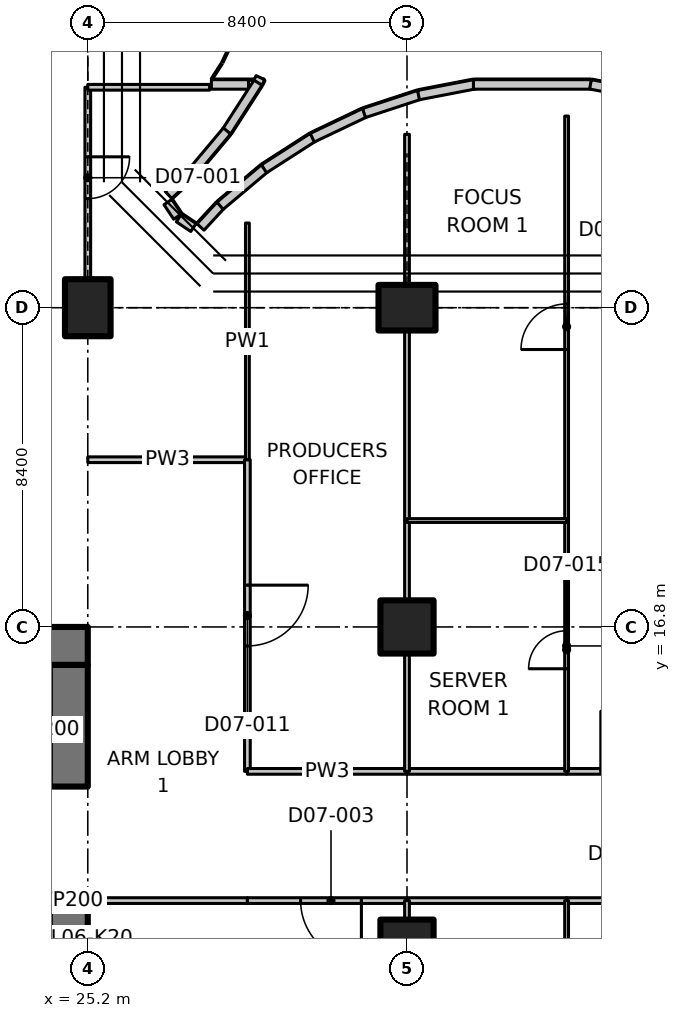
"""IFC4 building model, lengths in metres.
Left out: names, types, materials, properties, quantities, classifications, styles, units other than length and angle.
Written with IfcOpenShell. Run it as: python <this file> out.ifc"""

import sys

from ifc_helpers import new_model, si_unit, direction, frame, frame_2d, origin, origin_2d, place, context, subcontext, project, spatial, polyline, rectangle, outline, extrude, element, fill, save


model = new_model("IFC4")
c1 = context("Model", 3, precision=1e-05, world=origin(), true_north=direction((0.0, 1.0)))
c2 = subcontext(c1, "Body", "Model", "MODEL_VIEW")
j1 = project(units=[si_unit("LENGTHUNIT", "METRE"), si_unit("PLANEANGLEUNIT", "RADIAN")], contexts=[c1])
p1 = place(None, origin())
s1 = spatial("IfcSite", under=j1, at=p1, CompositionType="ELEMENT")
p2 = place(p1, origin())
s2 = spatial("IfcBuilding", under=s1, at=p2, CompositionType="ELEMENT")
p3 = place(p2, frame((0.0, 0.0, 36.5)))
s3 = spatial("IfcBuildingStorey", under=s2, at=p3, CompositionType="ELEMENT", Elevation=36.5)
p4 = place(p3, frame((25.2, 25.2, 0.0), z_axis=(0.0, 0.0, 1.0), x_axis=(1.0, 0.0, 0.0)))
e1 = element("IfcColumn", 1, at=p4, inside=s3, PredefinedType="COLUMN", context=c2, shape_type="SweptSolid", body=[
    extrude(rectangle(XDim=1.2, YDim=1.5, at=origin_2d()), origin(), (0.0, 0.0, 1.0), 3.35),
])
for number, where, z_axis, x_axis in (
    (2, (33.6, 8.4, 0.0), (0.0, 0.0, 1.0), (1.0, 0.0, 0.0)),
    (3, (33.6, 16.8, 0.0), (0.0, 0.0, 1.0), (1.0, 0.0, 0.0)),
):
    element("IfcColumn", number, at=place(p3, frame(where, z_axis=z_axis, x_axis=x_axis)), inside=s3, PredefinedType="COLUMN", context=c2, shape_type="SweptSolid", body=[
        extrude(rectangle(XDim=1.4, YDim=1.4, at=origin_2d()), origin(), (0.0, 0.0, 1.0), 3.35),
    ])
p5 = place(p3, frame((33.6, 25.2, 0.0), z_axis=(0.0, 0.0, 1.0), x_axis=(0.0, 1.0, 0.0)))
e4 = element("IfcColumn", 4, at=p5, inside=s3, PredefinedType="COLUMN", context=c2, shape_type="SweptSolid", body=[
    extrude(rectangle(XDim=1.2, YDim=1.5, at=origin_2d()), origin(), (0.0, 0.0, 1.0), 3.35),
])
p6 = place(p3, frame((28.453, 31.075, 0.0), z_axis=(0.0, 0.0, 1.0), x_axis=(1.0, 0.0, 0.0)))
e5 = element("IfcWall", 5, at=p6, inside=s3, PredefinedType="PARAPET", context=c2, shape_type="SweptSolid", body=[
    extrude(rectangle(XDim=0.977, YDim=0.25, at=frame_2d((0.489, 0.0))), origin(), (0.0, 0.0, 1.0), 1.1),
])
p7 = place(p3, frame((29.742, 31.254, 0.0), z_axis=(0.0, 0.0, 1.0), x_axis=(-0.430340964607, -0.902666413566, 0.0)))
e6 = element("IfcWall", 6, at=p7, inside=s3, PredefinedType="PARAPET", context=c2, shape_type="SweptSolid", body=[
    extrude(rectangle(XDim=0.163, YDim=0.25, at=frame_2d((0.082, 0.0))), origin(), (0.0, 0.0, 1.0), 1.1),
])
for number, where, z_axis, x_axis in (
    (7, (29.68, 31.121, 0.0), (0.0, 0.0, 1.0), (-0.541, -0.841, 0.0)),
    (8, (28.864, 29.85, 0.0), (0.0, 0.0, 1.0), (-0.643, -0.766, 0.0)),
):
    element("IfcWall", number, at=place(p3, frame(where, z_axis=z_axis, x_axis=x_axis)), inside=s3, PredefinedType="PARAPET", context=c2, shape_type="SweptSolid", body=[
        extrude(rectangle(XDim=1.526, YDim=0.25, at=frame_2d((0.763, 0.0))), origin(), (0.0, 0.0, 1.0), 1.1),
    ])
p8 = place(p3, frame((27.894, 28.693, 0.0), z_axis=(0.0, 0.0, 1.0), x_axis=(-0.734682907752, -0.678410661073, 0.0)))
e9 = element("IfcWall", 9, at=p8, inside=s3, PredefinedType="PARAPET", context=c2, shape_type="SweptSolid", body=[
    extrude(rectangle(XDim=0.777, YDim=0.25, at=frame_2d((0.388, 0.0))), origin(), (0.0, 0.0, 1.0), 1.1),
])
for number, where, z_axis, x_axis in (
    (10, (27.309, 27.98, 0.0), (0.0, 0.0, 1.0), (0.556, -0.831, 0.0)),
    (11, (27.599, 27.564, 0.0), (0.0, 0.0, 1.0), (0.831, -0.556, 0.0)),
):
    element("IfcWall", number, at=place(p3, frame(where, z_axis=z_axis, x_axis=x_axis)), inside=s3, PredefinedType="PARAPET", context=c2, shape_type="SweptSolid", body=[
        extrude(rectangle(XDim=0.459, YDim=0.25, at=frame_2d((0.229, 0.0))), origin(), (0.0, 0.0, 1.0), 1.1),
    ])
p9 = place(p3, frame((28.166, 27.323, 0.0), z_axis=(0.0, 0.0, 1.0), x_axis=(0.678410661073, 0.734682907752, 0.0)))
e12 = element("IfcWall", 12, at=p9, inside=s3, PredefinedType="PARAPET", context=c2, shape_type="SweptSolid", body=[
    extrude(rectangle(XDim=0.777, YDim=0.25, at=frame_2d((0.388, 0.0))), origin(), (0.0, 0.0, 1.0), 1.1),
])
for number, where, z_axis, x_axis in (
    (13, (28.682, 27.883, 0.0), (0.0, 0.0, 1.0), (0.766, 0.643, 0.0)),
    (14, (29.837, 28.854, 0.0), (0.0, 0.0, 1.0), (0.841, 0.541, 0.0)),
):
    element("IfcWall", number, at=place(p3, frame(where, z_axis=z_axis, x_axis=x_axis)), inside=s3, PredefinedType="PARAPET", context=c2, shape_type="SweptSolid", body=[
        extrude(rectangle(XDim=1.526, YDim=0.25, at=frame_2d((0.763, 0.0))), origin(), (0.0, 0.0, 1.0), 1.1),
    ])
p10 = place(p3, frame((31.107, 29.672, 0.0), z_axis=(0.0, 0.0, 1.0), x_axis=(0.902810221444, 0.430039188977, 0.0)))
e15 = element("IfcWall", 15, at=p10, inside=s3, PredefinedType="PARAPET", context=c2, shape_type="SweptSolid", body=[
    extrude(rectangle(XDim=1.525, YDim=0.25, at=frame_2d((0.763, 0.0))), origin(), (0.0, 0.0, 1.0), 1.1),
])
p11 = place(p3, frame((32.469, 30.322, 0.0), z_axis=(0.0, 0.0, 1.0), x_axis=(0.95006631844, 0.312048058103, 0.0)))
e16 = element("IfcWall", 16, at=p11, inside=s3, PredefinedType="PARAPET", context=c2, shape_type="SweptSolid", body=[
    extrude(rectangle(XDim=1.526, YDim=0.25, at=frame_2d((0.763, 0.0))), origin(), (0.0, 0.0, 1.0), 1.1),
])
p12 = place(p3, frame((33.903, 30.794, 0.0), z_axis=(0.0, 0.0, 1.0), x_axis=(0.981913193778, 0.189331666354, 0.0)))
e17 = element("IfcWall", 17, at=p12, inside=s3, PredefinedType="PARAPET", context=c2, shape_type="SweptSolid", body=[
    extrude(rectangle(XDim=1.496, YDim=0.25, at=frame_2d((0.748, 0.0))), origin(), (0.0, 0.0, 1.0), 1.1),
])
p13 = place(p3, frame((35.348, 31.075, 0.0), z_axis=(0.0, 0.0, 1.0), x_axis=(1.0, 0.0, 0.0)))
e18 = element("IfcWall", 18, at=p13, inside=s3, PredefinedType="PARAPET", context=c2, shape_type="SweptSolid", body=[
    extrude(rectangle(XDim=3.103, YDim=0.25, at=frame_2d((1.552, 0.0))), origin(), (0.0, 0.0, 1.0), 1.1),
])
p14 = place(p3, frame((38.428, 31.077, 0.0), z_axis=(0.0, 0.0, 1.0), x_axis=(0.981913193778, -0.189331666354, 0.0)))
e19 = element("IfcWall", 19, at=p14, inside=s3, PredefinedType="PARAPET", context=c2, shape_type="SweptSolid", body=[
    extrude(rectangle(XDim=1.496, YDim=0.25, at=frame_2d((0.748, 0.0))), origin(), (0.0, 0.0, 1.0), 1.1),
])
p15 = place(p3, frame((23.8, 16.3, 0.0), z_axis=(0.0, 0.0, 1.0), x_axis=(1.0, 0.0, 0.0)))
e20 = element("IfcWall", 20, at=p15, inside=s3, PredefinedType="SHEAR", context=c2, shape_type="SweptSolid", body=[
    extrude(rectangle(XDim=1.4, YDim=1.0, at=frame_2d((0.7, 0.0))), origin(), (0.0, 0.0, 1.0), 3.35),
])
p16 = place(p3, frame((24.7, 1.0, 0.0), z_axis=(0.0, 0.0, 1.0), x_axis=(0.0, 1.0, 0.0)))
e21 = element("IfcWall", 21, at=p16, inside=s3, PredefinedType="SHEAR", context=c2, shape_type="SweptSolid", body=[
    extrude(rectangle(XDim=8.8, YDim=1.0, at=frame_2d((4.4, 0.0))), origin(), (0.0, 0.0, 1.0), 3.35),
])
p17 = place(p3, frame((24.7, 12.6, 0.0), z_axis=(0.0, 0.0, 1.0), x_axis=(0.0, 1.0, 0.0)))
e22 = element("IfcWall", 22, at=p17, inside=s3, PredefinedType="SHEAR", context=c2, shape_type="SweptSolid", body=[
    extrude(rectangle(XDim=3.2, YDim=1.0, at=frame_2d((1.6, 0.0))), origin(), (0.0, 0.0, 1.0), 3.35),
])
for number, where, z_axis, x_axis in (
    (23, (25.2, 21.2, 0.0), (0.0, 0.0, 1.0), (1.0, 0.0, 0.0)),
    (24, (29.4, 9.6, 0.0), (0.0, 0.0, 1.0), (-1.0, 0.0, 0.0)),
):
    element("IfcWall", number, at=place(p3, frame(where, z_axis=z_axis, x_axis=x_axis)), inside=s3, PredefinedType="PARTITIONING", context=c2, shape_type="SweptSolid", body=[
        extrude(rectangle(XDim=4.2, YDim=0.15, at=frame_2d((2.1, 0.0))), origin(), (0.0, 0.0, 1.0), 3.33),
    ])
p18 = place(p3, frame((29.4, 21.2, 0.0), z_axis=(0.0, 0.0, 1.0), x_axis=(0.0, -1.0, 0.0)))
e25 = element("IfcWall", 25, at=p18, inside=s3, PredefinedType="PARTITIONING", context=c2, shape_type="SweptSolid", body=[
    extrude(rectangle(XDim=8.2, YDim=0.15, at=frame_2d((4.1, 0.0))), origin(), (0.0, 0.0, 1.0), 3.33),
])
p19 = place(p18, frame((3.3, 0.0, 0.0)))
e26 = element("IfcOpeningElement", 26, at=p19, cuts=e25, PredefinedType="OPENING", context=c2, shape_type="SweptSolid", body=[
    extrude(rectangle(XDim=1.6, YDim=2.1, at=frame_2d((0.8, 1.05))), frame((0.0, 0.085, 0.0), z_axis=(0.0, -1.0, 0.0), x_axis=(1.0, 0.0, 0.0)), (0.0, 0.0, 1.0), 0.17),
])
p20 = place(p3, frame((29.4, 27.429, 0.0), z_axis=(0.0, 0.0, 1.0), x_axis=(0.0, -1.0, 0.0)))
e27 = element("IfcWall", 27, at=p20, inside=s3, PredefinedType="PARTITIONING", context=c2, shape_type="SweptSolid", body=[
    extrude(outline(polyline([(0.0, 0.0), (6.229, 0.0), (6.229, 3.33), (2.679, 3.33), (2.677, 2.98), (1.781, 2.98), (1.779, 3.33), (0.154, 3.33), (0.0, 3.33), (0.0, 0.0)])), frame((0.0, 0.05, 0.0), z_axis=(0.0, -1.0, 0.0), x_axis=(1.0, 0.0, 0.0)), (0.0, 0.0, 1.0), 0.1),
])
p21 = place(p3, frame((25.2, 31.0, 0.0), z_axis=(0.0, 0.0, 1.0), x_axis=(0.0, -1.0, 0.0)))
e28 = element("IfcWall", 28, at=p21, inside=s3, PredefinedType="PARTITIONING", context=c2, shape_type="SweptSolid", body=[
    extrude(outline(polyline([(0.0, 0.0), (5.03, 0.0), (5.03, 2.98), (0.0, 2.98), (0.0, 0.0)])), frame((0.0, 0.075, 0.0), z_axis=(0.0, -1.0, 0.0), x_axis=(1.0, 0.0, 0.0)), (0.0, 0.0, 1.0), 0.15),
])
p22 = place(p21, frame((1.83, 0.0, 0.0)))
e29 = element("IfcOpeningElement", 29, at=p22, cuts=e28, PredefinedType="OPENING", context=c2, shape_type="SweptSolid", body=[
    extrude(rectangle(XDim=1.1, YDim=2.1, at=frame_2d((0.55, 1.05))), frame((0.0, 0.085, 0.0), z_axis=(0.0, -1.0, 0.0), x_axis=(1.0, 0.0, 0.0)), (0.0, 0.0, 1.0), 0.17),
])
p23 = place(p3, frame((25.2, 31.0, 0.0), z_axis=(0.0, 0.0, 1.0), x_axis=(1.0, 0.0, 0.0)))
e30 = element("IfcWall", 30, at=p23, inside=s3, PredefinedType="PARTITIONING", context=c2, shape_type="SweptSolid", body=[
    extrude(rectangle(XDim=3.206, YDim=0.15, at=frame_2d((1.603, 0.0))), origin(), (0.0, 0.0, 1.0), 2.98),
])
p24 = place(p3, frame((33.6, 9.6, 0.0), z_axis=(0.0, 0.0, 1.0), x_axis=(-1.0, 0.0, 0.0)))
e31 = element("IfcWall", 31, at=p24, inside=s3, PredefinedType="PARTITIONING", context=c2, shape_type="SweptSolid", body=[
    extrude(rectangle(XDim=4.2, YDim=0.15, at=frame_2d((2.1, 0.0))), origin(), (0.0, 0.0, 1.0), 3.33),
])
p25 = place(p24, frame((1.2, 0.0, 0.0)))
e32 = element("IfcOpeningElement", 32, at=p25, cuts=e31, PredefinedType="OPENING", context=c2, shape_type="SweptSolid", body=[
    extrude(rectangle(XDim=1.6, YDim=2.1, at=frame_2d((0.8, 1.05))), frame((0.0, 0.085, 0.0), z_axis=(0.0, -1.0, 0.0), x_axis=(1.0, 0.0, 0.0)), (0.0, 0.0, 1.0), 0.17),
])
p26 = place(p3, frame((46.2, 9.6, 0.0), z_axis=(0.0, 0.0, 1.0), x_axis=(-1.0, 0.0, 0.0)))
e33 = element("IfcWall", 33, at=p26, inside=s3, PredefinedType="PARTITIONING", context=c2, shape_type="SweptSolid", body=[
    extrude(rectangle(XDim=8.4, YDim=0.15, at=frame_2d((4.2, 0.0))), origin(), (0.0, 0.0, 1.0), 3.33),
])
p27 = place(p26, frame((1.8, 0.0, 0.0)))
e34 = element("IfcOpeningElement", 34, at=p27, cuts=e33, PredefinedType="OPENING", context=c2, shape_type="SweptSolid", body=[
    extrude(rectangle(XDim=1.6, YDim=2.1, at=frame_2d((0.8, 1.05))), frame((0.0, 0.085, 0.0), z_axis=(0.0, -1.0, 0.0), x_axis=(1.0, 0.0, 0.0)), (0.0, 0.0, 1.0), 0.17),
])
p28 = place(p3, frame((37.8, 9.6, 0.0), z_axis=(0.0, 0.0, 1.0), x_axis=(-1.0, 0.0, 0.0)))
e35 = element("IfcWall", 35, at=p28, inside=s3, PredefinedType="PARTITIONING", context=c2, shape_type="SweptSolid", body=[
    extrude(rectangle(XDim=4.2, YDim=0.15, at=frame_2d((2.1, 0.0))), origin(), (0.0, 0.0, 1.0), 3.33),
])
p29 = place(p3, frame((29.4, 13.0, 0.0), z_axis=(0.0, 0.0, 1.0), x_axis=(1.0, 0.0, 0.0)))
e36 = element("IfcWall", 36, at=p29, inside=s3, PredefinedType="PARTITIONING", context=c2, shape_type="SweptSolid", body=[
    extrude(rectangle(XDim=4.2, YDim=0.15, at=frame_2d((2.1, 0.0))), origin(), (0.0, 0.0, 1.0), 3.33),
])
p30 = place(p3, frame((37.8, 13.0, 0.0), z_axis=(0.0, 0.0, 1.0), x_axis=(1.0, 0.0, 0.0)))
e37 = element("IfcWall", 37, at=p30, inside=s3, PredefinedType="PARTITIONING", context=c2, shape_type="SweptSolid", body=[
    extrude(rectangle(XDim=3.4, YDim=0.15, at=frame_2d((1.7, 0.0))), origin(), (0.0, 0.0, 1.0), 3.33),
])
p31 = place(p30, frame((0.9, 0.0, 0.0)))
e38 = element("IfcOpeningElement", 38, at=p31, cuts=e37, PredefinedType="OPENING", context=c2, shape_type="SweptSolid", body=[
    extrude(rectangle(XDim=1.6, YDim=2.1, at=frame_2d((0.8, 1.05))), frame((0.0, 0.085, 0.0), z_axis=(0.0, -1.0, 0.0), x_axis=(1.0, 0.0, 0.0)), (0.0, 0.0, 1.0), 0.17),
])
p32 = place(p3, frame((33.6, 13.0, 0.0), z_axis=(0.0, 0.0, 1.0), x_axis=(1.0, 0.0, 0.0)))
e39 = element("IfcWall", 39, at=p32, inside=s3, PredefinedType="PARTITIONING", context=c2, shape_type="SweptSolid", body=[
    extrude(rectangle(XDim=4.2, YDim=0.15, at=frame_2d((2.1, 0.0))), origin(), (0.0, 0.0, 1.0), 3.33),
])
p33 = place(p3, frame((33.6, 9.6, 0.0), z_axis=(0.0, 0.0, 1.0), x_axis=(0.0, -1.0, 0.0)))
e40 = element("IfcWall", 40, at=p33, inside=s3, PredefinedType="PARTITIONING", context=c2, shape_type="SweptSolid", body=[
    extrude(rectangle(XDim=0.48, YDim=0.125, at=frame_2d((0.24, 0.0))), origin(), (0.0, 0.0, 1.0), 3.33),
])
p34 = place(p3, frame((37.8, 1.8, 0.0), z_axis=(0.0, 0.0, 1.0), x_axis=(0.0, 1.0, 0.0)))
e41 = element("IfcWall", 41, at=p34, inside=s3, PredefinedType="PARTITIONING", context=c2, shape_type="SweptSolid", body=[
    extrude(rectangle(XDim=7.8, YDim=0.1, at=frame_2d((3.9, 0.0))), origin(), (0.0, 0.0, 1.0), 3.33),
])
p35 = place(p34, frame((3.3, 0.0, 0.0)))
e42 = element("IfcOpeningElement", 42, at=p35, cuts=e41, PredefinedType="OPENING", context=c2, shape_type="SweptSolid", body=[
    extrude(rectangle(XDim=1.0, YDim=2.1, at=frame_2d((0.5, 1.05))), frame((0.0, 0.06, 0.0), z_axis=(0.0, -1.0, 0.0), x_axis=(1.0, 0.0, 0.0)), (0.0, 0.0, 1.0), 0.12),
])
p36 = place(p3, frame((33.6, 19.6, 0.0), z_axis=(0.0, 0.0, 1.0), x_axis=(0.0, -1.0, 0.0)))
e43 = element("IfcWall", 43, at=p36, inside=s3, PredefinedType="PARTITIONING", context=c2, shape_type="SweptSolid", body=[
    extrude(rectangle(XDim=2.08, YDim=0.125, at=frame_2d((1.04, 0.0))), origin(), (0.0, 0.0, 1.0), 3.33),
])
p37 = place(p3, frame((33.6, 16.08, 0.0), z_axis=(0.0, 0.0, 1.0), x_axis=(0.0, -1.0, 0.0)))
e44 = element("IfcWall", 44, at=p37, inside=s3, PredefinedType="PARTITIONING", context=c2, shape_type="SweptSolid", body=[
    extrude(rectangle(XDim=3.08, YDim=0.125, at=frame_2d((1.54, 0.0))), origin(), (0.0, 0.0, 1.0), 3.33),
])
p38 = place(p3, frame((33.6, 29.762, 0.0), z_axis=(0.0, 0.0, 1.0), x_axis=(0.0, -1.0, 0.0)))
e45 = element("IfcWall", 45, at=p38, inside=s3, PredefinedType="PARTITIONING", context=c2, shape_type="SweptSolid", body=[
    extrude(rectangle(XDim=3.942, YDim=0.125, at=frame_2d((1.971, 0.0))), origin(), (0.0, 0.0, 1.0), 2.98),
])
p39 = place(p3, frame((33.6, 24.58, 0.0), z_axis=(0.0, 0.0, 1.0), x_axis=(0.0, -1.0, 0.0)))
e46 = element("IfcWall", 46, at=p39, inside=s3, PredefinedType="PARTITIONING", context=c2, shape_type="SweptSolid", body=[
    extrude(rectangle(XDim=4.98, YDim=0.125, at=frame_2d((2.49, 0.0))), origin(), (0.0, 0.0, 1.0), 3.33),
])
p40 = place(p3, frame((37.8, 13.0, 0.0), z_axis=(0.0, 0.0, 1.0), x_axis=(0.0, 1.0, 0.0)))
e47 = element("IfcWall", 47, at=p40, inside=s3, PredefinedType="PARTITIONING", context=c2, shape_type="SweptSolid", body=[
    extrude(rectangle(XDim=6.6, YDim=0.1, at=frame_2d((3.3, 0.0))), origin(), (0.0, 0.0, 1.0), 3.33),
])
p41 = place(p40, frame((2.7, 0.0, 0.0)))
e48 = element("IfcOpeningElement", 48, at=p41, cuts=e47, PredefinedType="OPENING", context=c2, shape_type="SweptSolid", body=[
    extrude(rectangle(XDim=1.0, YDim=2.1, at=frame_2d((0.5, 1.05))), frame((0.0, 0.06, 0.0), z_axis=(0.0, -1.0, 0.0), x_axis=(1.0, 0.0, 0.0)), (0.0, 0.0, 1.0), 0.12),
])
p42 = place(p3, frame((37.8, 19.6, 0.0), z_axis=(0.0, 0.0, 1.0), x_axis=(0.0, 1.0, 0.0)))
e49 = element("IfcWall", 49, at=p42, inside=s3, PredefinedType="PARTITIONING", context=c2, shape_type="SweptSolid", body=[
    extrude(outline(polyline([(0.0, 0.0), (10.643, 0.0), (10.643, 3.33), (6.05, 3.33), (6.048, 2.98), (5.152, 2.98), (5.15, 3.33), (0.0, 3.33), (0.0, 0.0)])), frame((0.0, 0.05, 0.0), z_axis=(0.0, -1.0, 0.0), x_axis=(1.0, 0.0, 0.0)), (0.0, 0.0, 1.0), 0.1),
])
p43 = place(p42, frame((4.5, 0.0, 0.0)))
e50 = element("IfcOpeningElement", 50, at=p43, cuts=e49, PredefinedType="OPENING", context=c2, shape_type="SweptSolid", body=[
    extrude(rectangle(XDim=1.2, YDim=2.1, at=frame_2d((0.6, 1.05))), frame((0.0, 0.06, 0.0), z_axis=(0.0, -1.0, 0.0), x_axis=(1.0, 0.0, 0.0)), (0.0, 0.0, 1.0), 0.12),
])
p44 = place(p3, frame((33.6, 19.6, 0.0), z_axis=(0.0, 0.0, 1.0), x_axis=(1.0, 0.0, 0.0)))
e51 = element("IfcWall", 51, at=p44, inside=s3, PredefinedType="PARTITIONING", context=c2, shape_type="SweptSolid", body=[
    extrude(rectangle(XDim=4.2, YDim=0.1, at=frame_2d((2.1, 0.0))), origin(), (0.0, 0.0, 1.0), 3.33),
])
p45 = place(p22, origin())
e52 = element("IfcDoor", 52, at=p45, inside=s3, OperationType="SINGLE_SWING_RIGHT", PredefinedType="DOOR", context=c2, shape_type="SweptSolid", body=[
    extrude(rectangle(XDim=1.1, YDim=2.1, at=frame_2d((0.55, 1.05))), frame((0.0, 0.025, 0.0), z_axis=(0.0, -1.0, 0.0), x_axis=(1.0, 0.0, 0.0)), (0.0, 0.0, 1.0), 0.05),
])
fill(e29, e52)
p46 = place(p25, origin())
e53 = element("IfcDoor", 53, at=p46, inside=s3, OperationType="DOUBLE_DOOR_SINGLE_SWING", PredefinedType="DOOR", context=c2, shape_type="SweptSolid", body=[
    extrude(rectangle(XDim=1.6, YDim=2.1, at=frame_2d((0.8, 1.05))), frame((0.0, 0.025, 0.0), z_axis=(0.0, -1.0, 0.0), x_axis=(1.0, 0.0, 0.0)), (0.0, 0.0, 1.0), 0.05),
])
fill(e32, e53)
p47 = place(p19, origin())
e54 = element("IfcDoor", 54, at=p47, inside=s3, OperationType="DOUBLE_DOOR_SINGLE_SWING", PredefinedType="DOOR", context=c2, shape_type="SweptSolid", body=[
    extrude(rectangle(XDim=1.6, YDim=2.1, at=frame_2d((0.8, 1.05))), frame((0.0, 0.025, 0.0), z_axis=(0.0, -1.0, 0.0), x_axis=(1.0, 0.0, 0.0)), (0.0, 0.0, 1.0), 0.05),
])
fill(e26, e54)
p48 = place(p31, origin())
e55 = element("IfcDoor", 55, at=p48, inside=s3, OperationType="DOUBLE_DOOR_SINGLE_SWING", PredefinedType="DOOR", context=c2, shape_type="SweptSolid", body=[
    extrude(rectangle(XDim=1.6, YDim=2.1, at=frame_2d((0.8, 1.05))), frame((0.0, 0.025, 0.0), z_axis=(0.0, -1.0, 0.0), x_axis=(1.0, 0.0, 0.0)), (0.0, 0.0, 1.0), 0.05),
])
fill(e38, e55)
p49 = place(p41, origin())
e56 = element("IfcDoor", 56, at=p49, inside=s3, OperationType="SINGLE_SWING_LEFT", PredefinedType="DOOR", context=c2, shape_type="SweptSolid", body=[
    extrude(rectangle(XDim=1.0, YDim=2.1, at=frame_2d((0.5, 1.05))), frame((0.0, 0.025, 0.0), z_axis=(0.0, -1.0, 0.0), x_axis=(1.0, 0.0, 0.0)), (0.0, 0.0, 1.0), 0.05),
])
fill(e48, e56)
p50 = place(p43, origin())
e57 = element("IfcDoor", 57, at=p50, inside=s3, OperationType="SINGLE_SWING_LEFT", PredefinedType="DOOR", context=c2, shape_type="SweptSolid", body=[
    extrude(rectangle(XDim=1.2, YDim=2.1, at=frame_2d((0.6, 1.05))), frame((0.0, 0.025, 0.0), z_axis=(0.0, -1.0, 0.0), x_axis=(1.0, 0.0, 0.0)), (0.0, 0.0, 1.0), 0.05),
])
fill(e50, e57)
save(model, sys.argv[1])
